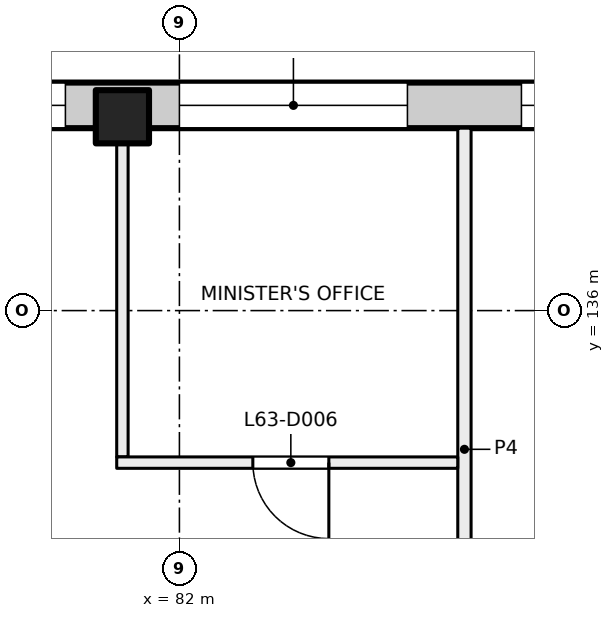
"""IFC4 building model, lengths in metres.
Left out: names, types, materials, properties, quantities, classifications, styles, units other than length and angle.
Written with IfcOpenShell. Run it as: python <this file> out.ifc"""

import sys

from ifc_helpers import new_model, si_unit, direction, frame, frame_2d, origin, origin_2d, place, context, subcontext, project, spatial, rectangle, extrude, element, fill, save


model = new_model("IFC4")
c1 = context("Model", 3, precision=1e-05, world=origin(), true_north=direction((0.0, 1.0)))
c2 = subcontext(c1, "Body", "Model", "MODEL_VIEW")
j1 = project(units=[si_unit("LENGTHUNIT", "METRE"), si_unit("PLANEANGLEUNIT", "RADIAN")], contexts=[c1])
p1 = place(None, origin())
s1 = spatial("IfcSite", under=j1, at=p1, CompositionType="ELEMENT")
p2 = place(p1, origin())
s2 = spatial("IfcBuilding", under=s1, at=p2, CompositionType="ELEMENT")
p3 = place(p2, frame((0.0, 0.0, 265.5)))
s3 = spatial("IfcBuildingStorey", under=s2, at=p3, CompositionType="ELEMENT", Elevation=265.5)
p4 = place(p3, frame((81.25, 138.55, 0.0), z_axis=(0.0, 0.0, 1.0), x_axis=(1.0, 0.0, 0.0)))
e1 = element("IfcColumn", 1, at=p4, inside=s3, PredefinedType="COLUMN", context=c2, shape_type="SweptSolid", body=[
    extrude(rectangle(XDim=0.7, YDim=0.7, at=origin_2d()), origin(), (0.0, 0.0, 1.0), 4.0),
])
p5 = place(p3, frame((47.07, 138.7, 0.0), z_axis=(0.0, 0.0, 1.0), x_axis=(1.0, 0.0, 0.0)))
e2 = element("IfcWall", 2, at=p5, inside=s3, PredefinedType="SOLIDWALL", context=c2, shape_type="SweptSolid", body=[
    extrude(rectangle(XDim=43.91, YDim=0.6, at=frame_2d((21.955, 0.0))), origin(), (0.0, 0.0, 1.0), 3.625),
])
p6 = place(p5, frame((4.03, 0.0, 0.0)))
e3 = element("IfcOpeningElement", 3, at=p6, cuts=e2, PredefinedType="OPENING", context=c2, shape_type="SweptSolid", body=[
    extrude(rectangle(XDim=1.8, YDim=2.4, at=frame_2d((0.9, 1.2))), frame((0.0, 0.31, 0.0), z_axis=(0.0, -1.0, 0.0), x_axis=(1.0, 0.0, 0.0)), (0.0, 0.0, 1.0), 0.62),
])
p7 = place(p5, frame((7.93, 0.0, 0.9)))
e4 = element("IfcOpeningElement", 4, at=p7, cuts=e2, PredefinedType="OPENING", context=c2, shape_type="SweptSolid", body=[
    extrude(rectangle(XDim=3.0, YDim=2.4, at=frame_2d((1.5, 1.2))), frame((0.0, 0.31, 0.0), z_axis=(0.0, -1.0, 0.0), x_axis=(1.0, 0.0, 0.0)), (0.0, 0.0, 1.0), 0.62),
])
p8 = place(p5, frame((12.43, 0.0, 0.9)))
e5 = element("IfcOpeningElement", 5, at=p8, cuts=e2, PredefinedType="OPENING", context=c2, shape_type="SweptSolid", body=[
    extrude(rectangle(XDim=3.0, YDim=2.4, at=frame_2d((1.5, 1.2))), frame((0.0, 0.31, 0.0), z_axis=(0.0, -1.0, 0.0), x_axis=(1.0, 0.0, 0.0)), (0.0, 0.0, 1.0), 0.62),
])
p9 = place(p5, frame((17.53, 0.0, 0.0)))
e6 = element("IfcOpeningElement", 6, at=p9, cuts=e2, PredefinedType="OPENING", context=c2, shape_type="SweptSolid", body=[
    extrude(rectangle(XDim=1.8, YDim=2.4, at=frame_2d((0.9, 1.2))), frame((0.0, 0.31, 0.0), z_axis=(0.0, -1.0, 0.0), x_axis=(1.0, 0.0, 0.0)), (0.0, 0.0, 1.0), 0.62),
])
p10 = place(p5, frame((21.43, 0.0, 0.9)))
e7 = element("IfcOpeningElement", 7, at=p10, cuts=e2, PredefinedType="OPENING", context=c2, shape_type="SweptSolid", body=[
    extrude(rectangle(XDim=3.0, YDim=2.4, at=frame_2d((1.5, 1.2))), frame((0.0, 0.31, 0.0), z_axis=(0.0, -1.0, 0.0), x_axis=(1.0, 0.0, 0.0)), (0.0, 0.0, 1.0), 0.62),
])
p11 = place(p5, frame((25.93, 0.0, 0.9)))
e8 = element("IfcOpeningElement", 8, at=p11, cuts=e2, PredefinedType="OPENING", context=c2, shape_type="SweptSolid", body=[
    extrude(rectangle(XDim=3.0, YDim=2.4, at=frame_2d((1.5, 1.2))), frame((0.0, 0.31, 0.0), z_axis=(0.0, -1.0, 0.0), x_axis=(1.0, 0.0, 0.0)), (0.0, 0.0, 1.0), 0.62),
])
p12 = place(p5, frame((30.43, 0.0, 0.9)))
e9 = element("IfcOpeningElement", 9, at=p12, cuts=e2, PredefinedType="OPENING", context=c2, shape_type="SweptSolid", body=[
    extrude(rectangle(XDim=3.0, YDim=2.4, at=frame_2d((1.5, 1.2))), frame((0.0, 0.31, 0.0), z_axis=(0.0, -1.0, 0.0), x_axis=(1.0, 0.0, 0.0)), (0.0, 0.0, 1.0), 0.62),
])
p13 = place(p5, frame((34.93, 0.0, 0.9)))
e10 = element("IfcOpeningElement", 10, at=p13, cuts=e2, PredefinedType="OPENING", context=c2, shape_type="SweptSolid", body=[
    extrude(rectangle(XDim=3.0, YDim=2.4, at=frame_2d((1.5, 1.2))), frame((0.0, 0.31, 0.0), z_axis=(0.0, -1.0, 0.0), x_axis=(1.0, 0.0, 0.0)), (0.0, 0.0, 1.0), 0.62),
])
p14 = place(p5, frame((39.43, 0.0, 0.9)))
e11 = element("IfcOpeningElement", 11, at=p14, cuts=e2, PredefinedType="OPENING", context=c2, shape_type="SweptSolid", body=[
    extrude(rectangle(XDim=3.0, YDim=2.4, at=frame_2d((1.5, 1.2))), frame((0.0, 0.31, 0.0), z_axis=(0.0, -1.0, 0.0), x_axis=(1.0, 0.0, 0.0)), (0.0, 0.0, 1.0), 0.62),
])
p15 = place(p3, frame((81.25, 134.075, 0.0), z_axis=(0.0, 0.0, 1.0), x_axis=(0.0, 1.0, 0.0)))
e12 = element("IfcWall", 12, at=p15, inside=s3, PredefinedType="PARTITIONING", context=c2, shape_type="SweptSolid", body=[
    extrude(rectangle(XDim=4.325, YDim=0.15, at=frame_2d((2.163, 0.0))), origin(), (0.0, 0.0, 1.0), 3.625),
])
p16 = place(p3, frame((85.75, 129.95, 0.0), z_axis=(0.0, 0.0, 1.0), x_axis=(0.0, 1.0, 0.0)))
e13 = element("IfcWall", 13, at=p16, inside=s3, PredefinedType="PARTITIONING", context=c2, shape_type="SweptSolid", body=[
    extrude(rectangle(XDim=8.45, YDim=0.175, at=frame_2d((4.225, 0.0))), origin(), (0.0, 0.0, 1.0), 3.625),
])
p17 = place(p3, frame((85.662, 134.0, 0.0), z_axis=(0.0, 0.0, 1.0), x_axis=(-1.0, 0.0, 0.0)))
e14 = element("IfcWall", 14, at=p17, inside=s3, PredefinedType="PARTITIONING", context=c2, shape_type="SweptSolid", body=[
    extrude(rectangle(XDim=4.487, YDim=0.15, at=frame_2d((2.244, 0.0))), origin(), (0.0, 0.0, 1.0), 3.625),
])
p18 = place(p17, frame((1.696, 0.0, 0.0)))
e15 = element("IfcOpeningElement", 15, at=p18, cuts=e14, PredefinedType="OPENING", context=c2, shape_type="SweptSolid", body=[
    extrude(rectangle(XDim=1.0, YDim=2.1, at=frame_2d((0.5, 1.05))), frame((0.0, 0.085, 0.0), z_axis=(0.0, -1.0, 0.0), x_axis=(1.0, 0.0, 0.0)), (0.0, 0.0, 1.0), 0.17),
])
p19 = place(p12, origin())
e16 = element("IfcWindow", 16, at=p19, inside=s3, PartitioningType="SINGLE_PANEL", PredefinedType="WINDOW", context=c2, shape_type="SweptSolid", body=[
    extrude(rectangle(XDim=3.0, YDim=2.4, at=frame_2d((1.5, 1.2))), frame((0.0, 0.03, 0.0), z_axis=(0.0, -1.0, 0.0), x_axis=(1.0, 0.0, 0.0)), (0.0, 0.0, 1.0), 0.06),
])
fill(e9, e16)
p20 = place(p13, origin())
e17 = element("IfcWindow", 17, at=p20, inside=s3, PartitioningType="SINGLE_PANEL", PredefinedType="WINDOW", context=c2, shape_type="SweptSolid", body=[
    extrude(rectangle(XDim=3.0, YDim=2.4, at=frame_2d((1.5, 1.2))), frame((0.0, 0.03, 0.0), z_axis=(0.0, -1.0, 0.0), x_axis=(1.0, 0.0, 0.0)), (0.0, 0.0, 1.0), 0.06),
])
fill(e10, e17)
p21 = place(p14, origin())
e18 = element("IfcWindow", 18, at=p21, inside=s3, PartitioningType="SINGLE_PANEL", PredefinedType="WINDOW", context=c2, shape_type="SweptSolid", body=[
    extrude(rectangle(XDim=3.0, YDim=2.4, at=frame_2d((1.5, 1.2))), frame((0.0, 0.03, 0.0), z_axis=(0.0, -1.0, 0.0), x_axis=(1.0, 0.0, 0.0)), (0.0, 0.0, 1.0), 0.06),
])
fill(e11, e18)
p22 = place(p18, origin())
e19 = element("IfcDoor", 19, at=p22, inside=s3, OperationType="SINGLE_SWING_LEFT", PredefinedType="DOOR", context=c2, shape_type="SweptSolid", body=[
    extrude(rectangle(XDim=1.0, YDim=2.1, at=frame_2d((0.5, 1.05))), frame((0.0, 0.025, 0.0), z_axis=(0.0, -1.0, 0.0), x_axis=(1.0, 0.0, 0.0)), (0.0, 0.0, 1.0), 0.05),
])
fill(e15, e19)
save(model, sys.argv[1])
